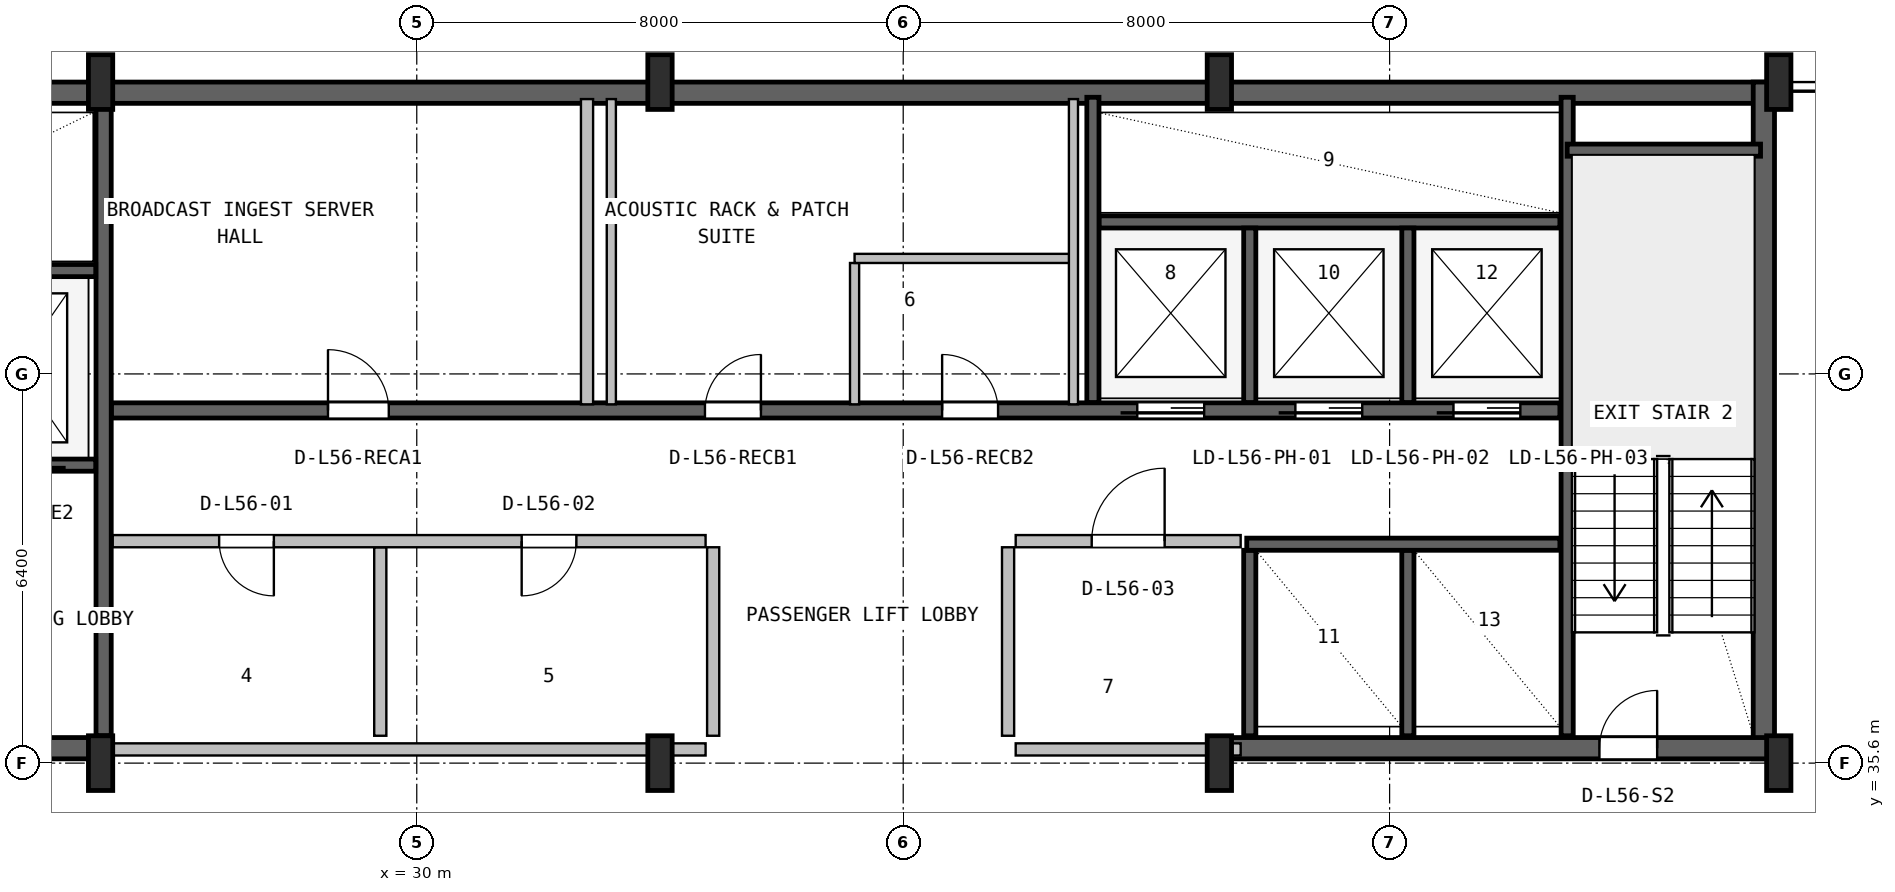
"""IFC4 building model, lengths in metres.
Left out: names, types, materials, properties, quantities, classifications, styles, units other than length and angle.
Written with IfcOpenShell. Run it as: python <this file> out.ifc"""

import sys

from ifc_helpers import new_model, si_unit, direction, frame, frame_2d, origin, origin_2d, place, context, subcontext, project, spatial, rectangle, i_section, extrude, source, transform, mapped, element, fill, save


model = new_model("IFC4")
c1 = context("Model", 3, precision=1e-05, world=origin(), true_north=direction((0.0, 1.0)))
c2 = subcontext(c1, "Body", "Model", "MODEL_VIEW")
j1 = project(units=[si_unit("LENGTHUNIT", "METRE"), si_unit("PLANEANGLEUNIT", "RADIAN")], contexts=[c1])
p1 = place(None, origin())
s1 = spatial("IfcSite", under=j1, at=p1, CompositionType="ELEMENT")
p2 = place(p1, origin())
s2 = spatial("IfcBuilding", under=s1, at=p2, CompositionType="ELEMENT")
p3 = place(p2, frame((0.0, 0.0, 226.4)))
s3 = spatial("IfcBuildingStorey", under=s2, at=p3, CompositionType="ELEMENT", Elevation=226.4)
p4 = place(p3, frame((15.6, 46.625, 0.0), z_axis=(0.0, 0.0, 1.0), x_axis=(1.0, 0.0, 0.0)))
e1 = element("IfcWall", 1, at=p4, inside=s3, PredefinedType="SHEAR", context=c2, shape_type="SweptSolid", body=[
    extrude(rectangle(XDim=36.8, YDim=0.35, at=frame_2d((18.4, 0.0))), origin(), (0.0, 0.0, 1.0), 3.55),
])
p5 = place(p3, frame((52.155, 35.67, 0.0), z_axis=(0.0, 0.0, 1.0), x_axis=(0.0, 1.0, 0.0)))
e2 = element("IfcWall", 2, at=p5, inside=s3, PredefinedType="SHEAR", context=c2, shape_type="SweptSolid", body=[
    extrude(rectangle(XDim=11.13, YDim=0.35, at=frame_2d((5.565, 0.0))), origin(), (0.0, 0.0, 1.0), 3.55),
])
p6 = place(p3, frame((15.67, 35.845, 0.0), z_axis=(0.0, 0.0, 1.0), x_axis=(1.0, 0.0, 0.0)))
e3 = element("IfcWall", 3, at=p6, inside=s3, PredefinedType="SHEAR", context=c2, shape_type="SweptSolid", body=[
    extrude(rectangle(XDim=9.13, YDim=0.35, at=frame_2d((4.565, 0.0))), origin(), (0.0, 0.0, 1.0), 3.55),
])
p7 = place(p6, frame((5.4, 0.0, 0.0)))
e4 = element("IfcOpeningElement", 4, at=p7, cuts=e3, PredefinedType="OPENING", context=c2, shape_type="SweptSolid", body=[
    extrude(rectangle(XDim=1.0, YDim=2.1, at=frame_2d((0.5, 1.05))), frame((0.0, 0.185, 0.0), z_axis=(0.0, -1.0, 0.0), x_axis=(1.0, 0.0, 0.0)), (0.0, 0.0, 1.0), 0.37),
])
p8 = place(p3, frame((43.2, 35.845, 0.0), z_axis=(0.0, 0.0, 1.0), x_axis=(1.0, 0.0, 0.0)))
e5 = element("IfcWall", 5, at=p8, inside=s3, PredefinedType="SHEAR", context=c2, shape_type="SweptSolid", body=[
    extrude(rectangle(XDim=9.13, YDim=0.35, at=frame_2d((4.565, 0.0))), origin(), (0.0, 0.0, 1.0), 3.55),
])
p9 = place(p8, frame((6.25, 0.0, 0.0)))
e6 = element("IfcOpeningElement", 6, at=p9, cuts=e5, PredefinedType="OPENING", context=c2, shape_type="SweptSolid", body=[
    extrude(rectangle(XDim=0.95, YDim=2.1, at=frame_2d((0.475, 1.05))), frame((0.0, 0.185, 0.0), z_axis=(0.0, -1.0, 0.0), x_axis=(1.0, 0.0, 0.0)), (0.0, 0.0, 1.0), 0.37),
])
m1 = source(origin(), c2, "Body", "SweptSolid", [
    extrude(i_section(OverallWidth=0.4, OverallDepth=0.9, WebThickness=0.016, FlangeThickness=0.028, FilletRadius=0.016, at=origin_2d()), origin(), (0.0, 0.0, 1.0), 3.8),
])
for number, where, z_axis, x_axis in (
    (7, (24.8, 35.6, 0.0), (0.0, 0.0, 1.0), (1.0, 0.0, 0.0)),
    (8, (24.8, 46.8, 0.0), (0.0, 0.0, 1.0), (1.0, 0.0, 0.0)),
    (9, (34.0, 35.6, 0.0), (0.0, 0.0, 1.0), (1.0, 0.0, 0.0)),
    (10, (34.0, 46.8, 0.0), (0.0, 0.0, 1.0), (1.0, 0.0, 0.0)),
    (11, (43.2, 35.6, 0.0), (0.0, 0.0, 1.0), (1.0, 0.0, 0.0)),
    (12, (43.2, 46.8, 0.0), (0.0, 0.0, 1.0), (1.0, 0.0, 0.0)),
    (13, (52.4, 35.6, 0.0), (0.0, 0.0, 1.0), (1.0, 0.0, 0.0)),
    (14, (52.4, 46.8, 0.0), (0.0, 0.0, 1.0), (1.0, 0.0, 0.0)),
):
    element("IfcColumn", number, at=place(p3, frame(where, z_axis=z_axis, x_axis=x_axis)), inside=s3, PredefinedType="COLUMN", context=c2, shape_type="MappedRepresentation", body=[
        mapped(m1, transform((0.0, 0.0, 0.0), x_axis=(1.0, 0.0, 0.0), y_axis=(0.0, 1.0, 0.0), z_axis=(0.0, 0.0, 1.0), scale=1.0)),
    ])
p10 = place(p3, frame((24.85, 36.05, 0.0), z_axis=(0.0, 0.0, 1.0), x_axis=(0.0, 1.0, 0.0)))
e15 = element("IfcWall", 15, at=p10, inside=s3, PredefinedType="SHEAR", context=c2, shape_type="SweptSolid", body=[
    extrude(rectangle(XDim=10.45, YDim=0.25, at=frame_2d((5.225, 0.0))), origin(), (0.0, 0.0, 1.0), 3.55),
])
p11 = place(p3, frame((19.2, 40.5, 0.0), z_axis=(0.0, 0.0, 1.0), x_axis=(1.0, 0.0, 0.0)))
e16 = element("IfcWall", 16, at=p11, inside=s3, PredefinedType="SHEAR", context=c2, shape_type="SweptSolid", body=[
    extrude(rectangle(XDim=5.52, YDim=0.2, at=frame_2d((2.76, 0.0))), origin(), (0.0, 0.0, 1.0), 3.55),
])
p12 = place(p11, frame((1.05, 0.0, 0.0)))
e17 = element("IfcOpeningElement", 17, at=p12, cuts=e16, PredefinedType="OPENING", context=c2, shape_type="SweptSolid", body=[
    extrude(rectangle(XDim=1.1, YDim=2.18, at=frame_2d((0.55, 1.09))), frame((0.0, 0.11, 0.0), z_axis=(0.0, -1.0, 0.0), x_axis=(1.0, 0.0, 0.0)), (0.0, 0.0, 1.0), 0.22),
])
p13 = place(p11, frame((3.65, 0.0, 0.0)))
e18 = element("IfcOpeningElement", 18, at=p13, cuts=e16, PredefinedType="OPENING", context=c2, shape_type="SweptSolid", body=[
    extrude(rectangle(XDim=1.1, YDim=2.18, at=frame_2d((0.55, 1.09))), frame((0.0, 0.11, 0.0), z_axis=(0.0, -1.0, 0.0), x_axis=(1.0, 0.0, 0.0)), (0.0, 0.0, 1.0), 0.22),
])
p14 = place(p3, frame((19.2, 43.7, 0.0), z_axis=(0.0, 0.0, 1.0), x_axis=(1.0, 0.0, 0.0)))
e19 = element("IfcWall", 19, at=p14, inside=s3, PredefinedType="SHEAR", context=c2, shape_type="SweptSolid", body=[
    extrude(rectangle(XDim=5.52, YDim=0.2, at=frame_2d((2.76, 0.0))), origin(), (0.0, 0.0, 1.0), 3.55),
])
p15 = place(p3, frame((48.92, 36.05, 0.0), z_axis=(0.0, 0.0, 1.0), x_axis=(0.0, 1.0, 0.0)))
e20 = element("IfcWall", 20, at=p15, inside=s3, PredefinedType="SHEAR", context=c2, shape_type="SweptSolid", body=[
    extrude(rectangle(XDim=10.5, YDim=0.2, at=frame_2d((5.25, 0.0))), origin(), (0.0, 0.0, 1.0), 3.55),
])
p16 = place(p3, frame((48.92, 45.68, 0.0), z_axis=(0.0, 0.0, 1.0), x_axis=(1.0, 0.0, 0.0)))
e21 = element("IfcWall", 21, at=p16, inside=s3, PredefinedType="SHEAR", context=c2, shape_type="SweptSolid", body=[
    extrude(rectangle(XDim=3.18, YDim=0.2, at=frame_2d((1.59, 0.0))), origin(), (0.0, 0.0, 1.0), 3.55),
])
p17 = place(p3, frame((24.98, 41.4, 0.0), z_axis=(0.0, 0.0, 1.0), x_axis=(1.0, 0.0, 0.0)))
e22 = element("IfcWall", 22, at=p17, inside=s3, PredefinedType="SHEAR", context=c2, shape_type="SweptSolid", body=[
    extrude(rectangle(XDim=23.82, YDim=0.25, at=frame_2d((11.91, 0.0))), origin(), (0.0, 0.0, 1.0), 3.55),
])
p18 = place(p17, frame((16.87, 0.0, 0.0)))
e23 = element("IfcOpeningElement", 23, at=p18, cuts=e22, PredefinedType="OPENING", context=c2, shape_type="SweptSolid", body=[
    extrude(rectangle(XDim=1.1, YDim=2.18, at=frame_2d((0.55, 1.09))), frame((0.0, 0.135, 0.0), z_axis=(0.0, -1.0, 0.0), x_axis=(1.0, 0.0, 0.0)), (0.0, 0.0, 1.0), 0.27),
])
p19 = place(p17, frame((19.47, 0.0, 0.0)))
e24 = element("IfcOpeningElement", 24, at=p19, cuts=e22, PredefinedType="OPENING", context=c2, shape_type="SweptSolid", body=[
    extrude(rectangle(XDim=1.1, YDim=2.18, at=frame_2d((0.55, 1.09))), frame((0.0, 0.135, 0.0), z_axis=(0.0, -1.0, 0.0), x_axis=(1.0, 0.0, 0.0)), (0.0, 0.0, 1.0), 0.27),
])
p20 = place(p17, frame((22.07, 0.0, 0.0)))
e25 = element("IfcOpeningElement", 25, at=p20, cuts=e22, PredefinedType="OPENING", context=c2, shape_type="SweptSolid", body=[
    extrude(rectangle(XDim=1.1, YDim=2.18, at=frame_2d((0.55, 1.09))), frame((0.0, 0.135, 0.0), z_axis=(0.0, -1.0, 0.0), x_axis=(1.0, 0.0, 0.0)), (0.0, 0.0, 1.0), 0.27),
])
p21 = place(p17, frame((3.56, 0.0, 0.0)))
e26 = element("IfcOpeningElement", 26, at=p21, cuts=e22, PredefinedType="OPENING", context=c2, shape_type="SweptSolid", body=[
    extrude(rectangle(XDim=1.0, YDim=2.08, at=frame_2d((0.5, 1.04))), frame((0.0, 0.135, 0.0), z_axis=(0.0, -1.0, 0.0), x_axis=(1.0, 0.0, 0.0)), (0.0, 0.0, 1.0), 0.27),
])
p22 = place(p17, frame((9.76, 0.0, 0.0)))
e27 = element("IfcOpeningElement", 27, at=p22, cuts=e22, PredefinedType="OPENING", context=c2, shape_type="SweptSolid", body=[
    extrude(rectangle(XDim=0.92, YDim=2.08, at=frame_2d((0.46, 1.04))), frame((0.0, 0.135, 0.0), z_axis=(0.0, -1.0, 0.0), x_axis=(1.0, 0.0, 0.0)), (0.0, 0.0, 1.0), 0.27),
])
p23 = place(p17, frame((13.66, 0.0, 0.0)))
e28 = element("IfcOpeningElement", 28, at=p23, cuts=e22, PredefinedType="OPENING", context=c2, shape_type="SweptSolid", body=[
    extrude(rectangle(XDim=0.92, YDim=2.08, at=frame_2d((0.46, 1.04))), frame((0.0, 0.135, 0.0), z_axis=(0.0, -1.0, 0.0), x_axis=(1.0, 0.0, 0.0)), (0.0, 0.0, 1.0), 0.27),
])
p24 = place(p3, frame((41.22, 44.5, 0.0), z_axis=(0.0, 0.0, 1.0), x_axis=(1.0, 0.0, 0.0)))
e29 = element("IfcWall", 29, at=p24, inside=s3, PredefinedType="SHEAR", context=c2, shape_type="SweptSolid", body=[
    extrude(rectangle(XDim=7.58, YDim=0.2, at=frame_2d((3.79, 0.0))), origin(), (0.0, 0.0, 1.0), 3.55),
])
p25 = place(p3, frame((41.12, 41.53, 0.0), z_axis=(0.0, 0.0, 1.0), x_axis=(0.0, 1.0, 0.0)))
e30 = element("IfcWall", 30, at=p25, inside=s3, PredefinedType="SHEAR", context=c2, shape_type="SweptSolid", body=[
    extrude(rectangle(XDim=5.02, YDim=0.2, at=frame_2d((2.51, 0.0))), origin(), (0.0, 0.0, 1.0), 3.55),
])
for number, where, z_axis, x_axis in (
    (31, (43.7, 41.53, 0.0), (0.0, 0.0, 1.0), (0.0, 1.0, 0.0)),
    (32, (46.3, 41.53, 0.0), (0.0, 0.0, 1.0), (0.0, 1.0, 0.0)),
):
    element("IfcWall", number, at=place(p3, frame(where, z_axis=z_axis, x_axis=x_axis)), inside=s3, PredefinedType="SHEAR", context=c2, shape_type="SweptSolid", body=[
        extrude(rectangle(XDim=2.87, YDim=0.2, at=frame_2d((1.435, 0.0))), origin(), (0.0, 0.0, 1.0), 3.55),
    ])
for number, where, z_axis, x_axis in (
    (33, (43.7, 36.05, 0.0), (0.0, 0.0, 1.0), (0.0, 1.0, 0.0)),
    (34, (46.3, 36.05, 0.0), (0.0, 0.0, 1.0), (0.0, 1.0, 0.0)),
):
    element("IfcWall", number, at=place(p3, frame(where, z_axis=z_axis, x_axis=x_axis)), inside=s3, PredefinedType="SHEAR", context=c2, shape_type="SweptSolid", body=[
        extrude(rectangle(XDim=3.05, YDim=0.2, at=frame_2d((1.525, 0.0))), origin(), (0.0, 0.0, 1.0), 3.55),
    ])
p26 = place(p3, frame((43.65, 39.2, 0.0), z_axis=(0.0, 0.0, 1.0), x_axis=(1.0, 0.0, 0.0)))
e35 = element("IfcWall", 35, at=p26, inside=s3, PredefinedType="SHEAR", context=c2, shape_type="SweptSolid", body=[
    extrude(rectangle(XDim=5.15, YDim=0.2, at=frame_2d((2.575, 0.0))), origin(), (0.0, 0.0, 1.0), 3.55),
])
p27 = place(p3, frame((25.0, 35.825, 0.0), z_axis=(0.0, 0.0, 1.0), x_axis=(1.0, 0.0, 0.0)))
e36 = element("IfcWall", 36, at=p27, inside=s3, PredefinedType="PLUMBINGWALL", context=c2, shape_type="SweptSolid", body=[
    extrude(rectangle(XDim=9.75, YDim=0.2, at=frame_2d((4.875, 0.0))), origin(), (0.0, 0.0, 1.0), 2.575),
])
p28 = place(p3, frame((29.4, 36.05, 0.0), z_axis=(0.0, 0.0, 1.0), x_axis=(0.0, 1.0, 0.0)))
e37 = element("IfcWall", 37, at=p28, inside=s3, PredefinedType="PLUMBINGWALL", context=c2, shape_type="SweptSolid", body=[
    extrude(rectangle(XDim=3.1, YDim=0.2, at=frame_2d((1.55, 0.0))), origin(), (0.0, 0.0, 1.0), 3.53),
])
p29 = place(p3, frame((25.0, 39.25, 0.0), z_axis=(0.0, 0.0, 1.0), x_axis=(1.0, 0.0, 0.0)))
e38 = element("IfcWall", 38, at=p29, inside=s3, PredefinedType="PLUMBINGWALL", context=c2, shape_type="SweptSolid", body=[
    extrude(rectangle(XDim=9.75, YDim=0.2, at=frame_2d((4.875, 0.0))), origin(), (0.0, 0.0, 1.0), 3.53),
])
p30 = place(p29, frame((1.75, 0.0, 0.0)))
e39 = element("IfcOpeningElement", 39, at=p30, cuts=e38, PredefinedType="OPENING", context=c2, shape_type="SweptSolid", body=[
    extrude(rectangle(XDim=0.9, YDim=2.06, at=frame_2d((0.45, 1.03))), frame((0.0, 0.11, 0.0), z_axis=(0.0, -1.0, 0.0), x_axis=(1.0, 0.0, 0.0)), (0.0, 0.0, 1.0), 0.22),
])
p31 = place(p29, frame((6.725, 0.0, 0.0)))
e40 = element("IfcOpeningElement", 40, at=p31, cuts=e38, PredefinedType="OPENING", context=c2, shape_type="SweptSolid", body=[
    extrude(rectangle(XDim=0.9, YDim=2.06, at=frame_2d((0.45, 1.03))), frame((0.0, 0.11, 0.0), z_axis=(0.0, -1.0, 0.0), x_axis=(1.0, 0.0, 0.0)), (0.0, 0.0, 1.0), 0.22),
])
p32 = place(p3, frame((34.875, 36.05, 0.0), z_axis=(0.0, 0.0, 1.0), x_axis=(0.0, 1.0, 0.0)))
e41 = element("IfcWall", 41, at=p32, inside=s3, PredefinedType="PLUMBINGWALL", context=c2, shape_type="SweptSolid", body=[
    extrude(rectangle(XDim=3.1, YDim=0.2, at=frame_2d((1.55, 0.0))), origin(), (0.0, 0.0, 1.0), 3.53),
])
p33 = place(p3, frame((39.85, 35.825, 0.0), z_axis=(0.0, 0.0, 1.0), x_axis=(1.0, 0.0, 0.0)))
e42 = element("IfcWall", 42, at=p33, inside=s3, PredefinedType="SOLIDWALL", context=c2, shape_type="SweptSolid", body=[
    extrude(rectangle(XDim=3.7, YDim=0.2, at=frame_2d((1.85, 0.0))), origin(), (0.0, 0.0, 1.0), 2.575),
])
p34 = place(p3, frame((39.85, 39.25, 0.0), z_axis=(0.0, 0.0, 1.0), x_axis=(1.0, 0.0, 0.0)))
e43 = element("IfcWall", 43, at=p34, inside=s3, PredefinedType="SOLIDWALL", context=c2, shape_type="SweptSolid", body=[
    extrude(rectangle(XDim=3.7, YDim=0.2, at=frame_2d((1.85, 0.0))), origin(), (0.0, 0.0, 1.0), 3.53),
])
p35 = place(p34, frame((1.25, 0.0, 0.0)))
e44 = element("IfcOpeningElement", 44, at=p35, cuts=e43, PredefinedType="OPENING", context=c2, shape_type="SweptSolid", body=[
    extrude(rectangle(XDim=1.2, YDim=2.1, at=frame_2d((0.6, 1.05))), frame((0.0, 0.11, 0.0), z_axis=(0.0, -1.0, 0.0), x_axis=(1.0, 0.0, 0.0)), (0.0, 0.0, 1.0), 0.22),
])
p36 = place(p3, frame((39.725, 36.05, 0.0), z_axis=(0.0, 0.0, 1.0), x_axis=(0.0, 1.0, 0.0)))
e45 = element("IfcWall", 45, at=p36, inside=s3, PredefinedType="SOLIDWALL", context=c2, shape_type="SweptSolid", body=[
    extrude(rectangle(XDim=3.1, YDim=0.2, at=frame_2d((1.55, 0.0))), origin(), (0.0, 0.0, 1.0), 3.53),
])
p37 = place(p3, frame((32.8, 41.5, 0.0), z_axis=(0.0, 0.0, 1.0), x_axis=(0.0, 1.0, 0.0)))
e46 = element("IfcWall", 46, at=p37, inside=s3, PredefinedType="SOLIDWALL", context=c2, shape_type="SweptSolid", body=[
    extrude(rectangle(XDim=5.02, YDim=0.2, at=frame_2d((2.51, 0.0))), origin(), (0.0, 0.0, 1.0), 3.53),
])
p38 = place(p3, frame((37.2, 41.5, 0.0), z_axis=(0.0, 0.0, 1.0), x_axis=(0.0, 1.0, 0.0)))
e47 = element("IfcWall", 47, at=p38, inside=s3, PredefinedType="PARTITIONING", context=c2, shape_type="SweptSolid", body=[
    extrude(rectangle(XDim=2.325, YDim=0.15, at=frame_2d((1.163, 0.0))), origin(), (0.0, 0.0, 1.0), 3.53),
])
p39 = place(p3, frame((37.2, 43.9, 0.0), z_axis=(0.0, 0.0, 1.0), x_axis=(1.0, 0.0, 0.0)))
e48 = element("IfcWall", 48, at=p39, inside=s3, PredefinedType="PARTITIONING", context=c2, shape_type="SweptSolid", body=[
    extrude(rectangle(XDim=3.6, YDim=0.15, at=frame_2d((1.8, 0.0))), origin(), (0.0, 0.0, 1.0), 3.53),
])
for number, where, z_axis, x_axis in (
    (49, (40.8, 41.5, 0.0), (0.0, 0.0, 1.0), (0.0, 1.0, 0.0)),
    (50, (33.2, 41.5, 0.0), (0.0, 0.0, 1.0), (0.0, 1.0, 0.0)),
):
    element("IfcWall", number, at=place(p3, frame(where, z_axis=z_axis, x_axis=x_axis)), inside=s3, PredefinedType="PARTITIONING", context=c2, shape_type="SweptSolid", body=[
        extrude(rectangle(XDim=5.02, YDim=0.15, at=frame_2d((2.51, 0.0))), origin(), (0.0, 0.0, 1.0), 3.53),
    ])
m2 = source(origin(), c2, "Body", "SweptSolid", [
    extrude(rectangle(XDim=0.95, YDim=2.1, at=frame_2d((0.475, 1.05))), frame((0.0, 0.025, 0.0), z_axis=(0.0, -1.0, 0.0), x_axis=(1.0, 0.0, 0.0)), (0.0, 0.0, 1.0), 0.05),
])
p40 = place(p9, origin())
e51 = element("IfcDoor", 51, at=p40, inside=s3, OperationType="SINGLE_SWING_RIGHT", PredefinedType="DOOR", context=c2, shape_type="MappedRepresentation", body=[
    mapped(m2, transform((0.0, 0.0, 0.0), x_axis=(1.0, 0.0, 0.0), y_axis=(0.0, 1.0, 0.0), z_axis=(0.0, 0.0, 1.0), scale=1.0)),
])
fill(e6, e51)
m3 = source(origin(), c2, "Body", "SweptSolid", [
    extrude(rectangle(XDim=1.1, YDim=2.18, at=frame_2d((0.55, 1.09))), frame((0.0, 0.025, 0.0), z_axis=(0.0, -1.0, 0.0), x_axis=(1.0, 0.0, 0.0)), (0.0, 0.0, 1.0), 0.05),
])
p41 = place(p18, frame((1.1, 0.0, 0.0), z_axis=(0.0, 0.0, 1.0), x_axis=(-1.0, 0.0, 0.0)))
e52 = element("IfcDoor", 52, at=p41, inside=s3, OperationType="SLIDING_TO_LEFT", PredefinedType="DOOR", context=c2, shape_type="MappedRepresentation", body=[
    mapped(m3, transform((0.0, 0.0, 0.0), x_axis=(1.0, 0.0, 0.0), y_axis=(0.0, 1.0, 0.0), z_axis=(0.0, 0.0, 1.0), scale=1.0)),
])
fill(e23, e52)
p42 = place(p19, frame((1.1, 0.0, 0.0), z_axis=(0.0, 0.0, 1.0), x_axis=(-1.0, 0.0, 0.0)))
e53 = element("IfcDoor", 53, at=p42, inside=s3, OperationType="SLIDING_TO_LEFT", PredefinedType="DOOR", context=c2, shape_type="MappedRepresentation", body=[
    mapped(m3, transform((0.0, 0.0, 0.0), x_axis=(1.0, 0.0, 0.0), y_axis=(0.0, 1.0, 0.0), z_axis=(0.0, 0.0, 1.0), scale=1.0)),
])
fill(e24, e53)
p43 = place(p20, frame((1.1, 0.0, 0.0), z_axis=(0.0, 0.0, 1.0), x_axis=(-1.0, 0.0, 0.0)))
e54 = element("IfcDoor", 54, at=p43, inside=s3, OperationType="SLIDING_TO_LEFT", PredefinedType="DOOR", context=c2, shape_type="MappedRepresentation", body=[
    mapped(m3, transform((0.0, 0.0, 0.0), x_axis=(1.0, 0.0, 0.0), y_axis=(0.0, 1.0, 0.0), z_axis=(0.0, 0.0, 1.0), scale=1.0)),
])
fill(e25, e54)
m4 = source(origin(), c2, "Body", "SweptSolid", [
    extrude(rectangle(XDim=1.0, YDim=2.08, at=frame_2d((0.5, 1.04))), frame((0.0, 0.025, 0.0), z_axis=(0.0, -1.0, 0.0), x_axis=(1.0, 0.0, 0.0)), (0.0, 0.0, 1.0), 0.05),
])
p44 = place(p21, origin())
e55 = element("IfcDoor", 55, at=p44, inside=s3, OperationType="SINGLE_SWING_LEFT", PredefinedType="DOOR", context=c2, shape_type="MappedRepresentation", body=[
    mapped(m4, transform((0.0, 0.0, 0.0), x_axis=(1.0, 0.0, 0.0), y_axis=(0.0, 1.0, 0.0), z_axis=(0.0, 0.0, 1.0), scale=1.0)),
])
fill(e26, e55)
m5 = source(origin(), c2, "Body", "SweptSolid", [
    extrude(rectangle(XDim=0.92, YDim=2.08, at=frame_2d((0.46, 1.04))), frame((0.0, 0.025, 0.0), z_axis=(0.0, -1.0, 0.0), x_axis=(1.0, 0.0, 0.0)), (0.0, 0.0, 1.0), 0.05),
])
p45 = place(p22, origin())
e56 = element("IfcDoor", 56, at=p45, inside=s3, OperationType="SINGLE_SWING_RIGHT", PredefinedType="DOOR", context=c2, shape_type="MappedRepresentation", body=[
    mapped(m5, transform((0.0, 0.0, 0.0), x_axis=(1.0, 0.0, 0.0), y_axis=(0.0, 1.0, 0.0), z_axis=(0.0, 0.0, 1.0), scale=1.0)),
])
fill(e27, e56)
p46 = place(p23, origin())
e57 = element("IfcDoor", 57, at=p46, inside=s3, OperationType="SINGLE_SWING_LEFT", PredefinedType="DOOR", context=c2, shape_type="MappedRepresentation", body=[
    mapped(m5, transform((0.0, 0.0, 0.0), x_axis=(1.0, 0.0, 0.0), y_axis=(0.0, 1.0, 0.0), z_axis=(0.0, 0.0, 1.0), scale=1.0)),
])
fill(e28, e57)
m6 = source(origin(), c2, "Body", "SweptSolid", [
    extrude(rectangle(XDim=0.9, YDim=2.06, at=frame_2d((0.45, 1.03))), frame((0.0, 0.025, 0.0), z_axis=(0.0, -1.0, 0.0), x_axis=(1.0, 0.0, 0.0)), (0.0, 0.0, 1.0), 0.05),
])
p47 = place(p30, frame((0.9, 0.0, 0.0), z_axis=(0.0, 0.0, 1.0), x_axis=(-1.0, 0.0, 0.0)))
e58 = element("IfcDoor", 58, at=p47, inside=s3, OperationType="SINGLE_SWING_RIGHT", PredefinedType="DOOR", context=c2, shape_type="MappedRepresentation", body=[
    mapped(m6, transform((0.0, 0.0, 0.0), x_axis=(1.0, 0.0, 0.0), y_axis=(0.0, 1.0, 0.0), z_axis=(0.0, 0.0, 1.0), scale=1.0)),
])
fill(e39, e58)
p48 = place(p31, frame((0.9, 0.0, 0.0), z_axis=(0.0, 0.0, 1.0), x_axis=(-1.0, 0.0, 0.0)))
e59 = element("IfcDoor", 59, at=p48, inside=s3, OperationType="SINGLE_SWING_LEFT", PredefinedType="DOOR", context=c2, shape_type="MappedRepresentation", body=[
    mapped(m6, transform((0.0, 0.0, 0.0), x_axis=(1.0, 0.0, 0.0), y_axis=(0.0, 1.0, 0.0), z_axis=(0.0, 0.0, 1.0), scale=1.0)),
])
fill(e40, e59)
m7 = source(origin(), c2, "Body", "SweptSolid", [
    extrude(rectangle(XDim=1.2, YDim=2.1, at=frame_2d((0.6, 1.05))), frame((0.0, 0.025, 0.0), z_axis=(0.0, -1.0, 0.0), x_axis=(1.0, 0.0, 0.0)), (0.0, 0.0, 1.0), 0.05),
])
p49 = place(p35, origin())
e60 = element("IfcDoor", 60, at=p49, inside=s3, OperationType="SINGLE_SWING_RIGHT", PredefinedType="DOOR", context=c2, shape_type="MappedRepresentation", body=[
    mapped(m7, transform((0.0, 0.0, 0.0), x_axis=(1.0, 0.0, 0.0), y_axis=(0.0, 1.0, 0.0), z_axis=(0.0, 0.0, 1.0), scale=1.0)),
])
fill(e44, e60)
save(model, sys.argv[1])
